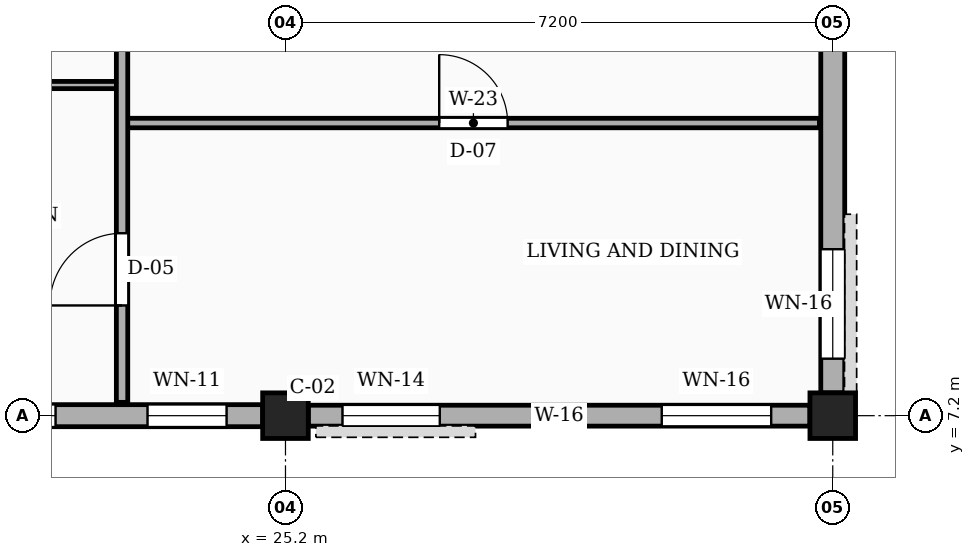
"""IFC4 building model, lengths in metres.
Left out: names, types, materials, properties, quantities, classifications, styles, units other than length and angle.
Written with IfcOpenShell. Run it as: python <this file> out.ifc"""

import sys

from ifc_helpers import new_model, si_unit, direction, frame, frame_2d, origin, origin_2d, place, context, subcontext, project, spatial, rectangle, extrude, element, fill, save


model = new_model("IFC4")
c1 = context("Model", 3, precision=1e-05, world=origin(), true_north=direction((0.0, 1.0)))
c2 = subcontext(c1, "Body", "Model", "MODEL_VIEW")
j1 = project(units=[si_unit("LENGTHUNIT", "METRE"), si_unit("PLANEANGLEUNIT", "RADIAN")], contexts=[c1])
p1 = place(None, origin())
s1 = spatial("IfcSite", under=j1, at=p1, CompositionType="ELEMENT")
p2 = place(p1, origin())
s2 = spatial("IfcBuilding", under=s1, at=p2, CompositionType="ELEMENT")
p3 = place(p2, frame((0.0, 0.0, 4.5)))
s3 = spatial("IfcBuildingStorey", under=s2, at=p3, CompositionType="ELEMENT", Elevation=4.5)
for number, where, z_axis, x_axis in (
    (1, (25.2, 7.2, 0.0), (0.0, 0.0, 1.0), (1.0, 0.0, 0.0)),
    (2, (32.4, 7.2, 0.0), (0.0, 0.0, 1.0), (1.0, 0.0, 0.0)),
):
    element("IfcColumn", number, at=place(p3, frame(where, z_axis=z_axis, x_axis=x_axis)), inside=s3, PredefinedType="COLUMN", context=c2, shape_type="SweptSolid", body=[
        extrude(rectangle(XDim=0.6, YDim=0.6, at=origin_2d()), origin(), (0.0, 0.0, 1.0), 3.15),
    ])
p4 = place(p3, frame((18.3, 7.2, 0.0), z_axis=(0.0, 0.0, 1.0), x_axis=(1.0, 0.0, 0.0)))
e3 = element("IfcWall", 3, at=p4, inside=s3, PredefinedType="SOLIDWALL", context=c2, shape_type="SweptSolid", body=[
    extrude(rectangle(XDim=6.6, YDim=0.29, at=frame_2d((3.3, 0.0))), origin(), (0.0, 0.0, 1.0), 2.44),
])
p5 = place(p4, frame((0.45, 0.0, 0.78)))
e4 = element("IfcOpeningElement", 4, at=p5, cuts=e3, PredefinedType="OPENING", context=c2, shape_type="SweptSolid", body=[
    extrude(rectangle(XDim=1.04, YDim=1.26, at=frame_2d((0.52, 0.63))), frame((0.0, 0.155, 0.0), z_axis=(0.0, -1.0, 0.0), x_axis=(1.0, 0.0, 0.0)), (0.0, 0.0, 1.0), 0.31),
])
p6 = place(p4, frame((2.675, 0.0, 0.78)))
e5 = element("IfcOpeningElement", 5, at=p6, cuts=e3, PredefinedType="OPENING", context=c2, shape_type="SweptSolid", body=[
    extrude(rectangle(XDim=1.2, YDim=1.26, at=frame_2d((0.6, 0.63))), frame((0.0, 0.155, 0.0), z_axis=(0.0, -1.0, 0.0), x_axis=(1.0, 0.0, 0.0)), (0.0, 0.0, 1.0), 0.31),
])
p7 = place(p4, frame((5.085, 0.0, 0.78)))
e6 = element("IfcOpeningElement", 6, at=p7, cuts=e3, PredefinedType="OPENING", context=c2, shape_type="SweptSolid", body=[
    extrude(rectangle(XDim=1.04, YDim=1.26, at=frame_2d((0.52, 0.63))), frame((0.0, 0.155, 0.0), z_axis=(0.0, -1.0, 0.0), x_axis=(1.0, 0.0, 0.0)), (0.0, 0.0, 1.0), 0.31),
])
p8 = place(p3, frame((25.5, 7.2, 0.0), z_axis=(0.0, 0.0, 1.0), x_axis=(1.0, 0.0, 0.0)))
e7 = element("IfcWall", 7, at=p8, inside=s3, PredefinedType="SOLIDWALL", context=c2, shape_type="SweptSolid", body=[
    extrude(rectangle(XDim=6.6, YDim=0.275, at=frame_2d((3.3, 0.0))), origin(), (0.0, 0.0, 1.0), 2.44),
])
p9 = place(p8, frame((0.45, 0.0, 0.78)))
e8 = element("IfcOpeningElement", 8, at=p9, cuts=e7, PredefinedType="OPENING", context=c2, shape_type="SweptSolid", body=[
    extrude(rectangle(XDim=1.28, YDim=1.26, at=frame_2d((0.64, 0.63))), frame((0.0, 0.147, 0.0), z_axis=(0.0, -1.0, 0.0), x_axis=(1.0, 0.0, 0.0)), (0.0, 0.0, 1.0), 0.295),
])
p10 = place(p8, frame((4.65, 0.0, 0.78)))
e9 = element("IfcOpeningElement", 9, at=p10, cuts=e7, PredefinedType="OPENING", context=c2, shape_type="SweptSolid", body=[
    extrude(rectangle(XDim=1.44, YDim=1.26, at=frame_2d((0.72, 0.63))), frame((0.0, 0.147, 0.0), z_axis=(0.0, -1.0, 0.0), x_axis=(1.0, 0.0, 0.0)), (0.0, 0.0, 1.0), 0.295),
])
p11 = place(p3, frame((32.4, 7.5, 0.0), z_axis=(0.0, 0.0, 1.0), x_axis=(0.0, 1.0, 0.0)))
e10 = element("IfcWall", 10, at=p11, inside=s3, PredefinedType="SOLIDWALL", context=c2, shape_type="SweptSolid", body=[
    extrude(rectangle(XDim=6.6, YDim=0.315, at=frame_2d((3.3, 0.0))), origin(), (0.0, 0.0, 1.0), 2.44),
])
p12 = place(p11, frame((0.45, 0.0, 0.78)))
e11 = element("IfcOpeningElement", 11, at=p12, cuts=e10, PredefinedType="OPENING", context=c2, shape_type="SweptSolid", body=[
    extrude(rectangle(XDim=1.44, YDim=1.26, at=frame_2d((0.72, 0.63))), frame((0.0, 0.167, 0.0), z_axis=(0.0, -1.0, 0.0), x_axis=(1.0, 0.0, 0.0)), (0.0, 0.0, 1.0), 0.335),
])
p13 = place(p11, frame((4.65, 0.0, 0.78)))
e12 = element("IfcOpeningElement", 12, at=p13, cuts=e10, PredefinedType="OPENING", context=c2, shape_type="SweptSolid", body=[
    extrude(rectangle(XDim=0.98, YDim=1.36, at=frame_2d((0.49, 0.68))), frame((0.0, 0.167, 0.0), z_axis=(0.0, -1.0, 0.0), x_axis=(1.0, 0.0, 0.0)), (0.0, 0.0, 1.0), 0.335),
])
p14 = place(p3, frame((23.12, 11.05, 0.0), z_axis=(0.0, 0.0, 1.0), x_axis=(1.0, 0.0, 0.0)))
e13 = element("IfcWall", 13, at=p14, inside=s3, PredefinedType="PARTITIONING", context=c2, shape_type="SweptSolid", body=[
    extrude(rectangle(XDim=9.105, YDim=0.125, at=frame_2d((4.552, 0.0))), origin(), (0.0, 0.0, 1.0), 2.305),
])
p15 = place(p14, frame((4.103, 0.0, 0.0)))
e14 = element("IfcOpeningElement", 14, at=p15, cuts=e13, PredefinedType="OPENING", context=c2, shape_type="SweptSolid", body=[
    extrude(rectangle(XDim=0.9, YDim=2.1, at=frame_2d((0.45, 1.05))), frame((0.0, 0.073, 0.0), z_axis=(0.0, -1.0, 0.0), x_axis=(1.0, 0.0, 0.0)), (0.0, 0.0, 1.0), 0.145),
])
p16 = place(p3, frame((20.19, 11.55, 0.0), z_axis=(0.0, 0.0, 1.0), x_axis=(1.0, 0.0, 0.0)))
e15 = element("IfcWall", 15, at=p16, inside=s3, PredefinedType="PARTITIONING", context=c2, shape_type="SweptSolid", body=[
    extrude(rectangle(XDim=2.79, YDim=0.095, at=frame_2d((1.395, 0.0))), origin(), (0.0, 0.0, 1.0), 2.305),
])
p17 = place(p16, frame((0.945, 0.0, 0.0)))
e16 = element("IfcOpeningElement", 16, at=p17, cuts=e15, PredefinedType="OPENING", context=c2, shape_type="SweptSolid", body=[
    extrude(rectangle(XDim=0.9, YDim=2.05, at=frame_2d((0.45, 1.025))), frame((0.0, 0.058, 0.0), z_axis=(0.0, -1.0, 0.0), x_axis=(1.0, 0.0, 0.0)), (0.0, 0.0, 1.0), 0.115),
])
p18 = place(p3, frame((23.05, 7.375, 0.0), z_axis=(0.0, 0.0, 1.0), x_axis=(0.0, 1.0, 0.0)))
e17 = element("IfcWall", 17, at=p18, inside=s3, PredefinedType="PARTITIONING", context=c2, shape_type="SweptSolid", body=[
    extrude(rectangle(XDim=6.885, YDim=0.15, at=frame_2d((3.442, 0.0))), origin(), (0.0, 0.0, 1.0), 2.305),
])
p19 = place(p18, frame((1.275, 0.0, 0.0)))
e18 = element("IfcOpeningElement", 18, at=p19, cuts=e17, PredefinedType="OPENING", context=c2, shape_type="SweptSolid", body=[
    extrude(rectangle(XDim=0.95, YDim=2.1, at=frame_2d((0.475, 1.05))), frame((0.0, 0.085, 0.0), z_axis=(0.0, -1.0, 0.0), x_axis=(1.0, 0.0, 0.0)), (0.0, 0.0, 1.0), 0.17),
])
p20 = place(p6, origin())
e19 = element("IfcWindow", 19, at=p20, inside=s3, PartitioningType="SINGLE_PANEL", PredefinedType="WINDOW", context=c2, shape_type="SweptSolid", body=[
    extrude(rectangle(XDim=1.2, YDim=1.26, at=frame_2d((0.6, 0.63))), frame((0.0, 0.03, 0.0), z_axis=(0.0, -1.0, 0.0), x_axis=(1.0, 0.0, 0.0)), (0.0, 0.0, 1.0), 0.06),
])
fill(e5, e19)
p21 = place(p7, origin())
e20 = element("IfcWindow", 20, at=p21, inside=s3, PartitioningType="SINGLE_PANEL", PredefinedType="WINDOW", context=c2, shape_type="SweptSolid", body=[
    extrude(rectangle(XDim=1.04, YDim=1.26, at=frame_2d((0.52, 0.63))), frame((0.0, 0.03, 0.0), z_axis=(0.0, -1.0, 0.0), x_axis=(1.0, 0.0, 0.0)), (0.0, 0.0, 1.0), 0.06),
])
fill(e6, e20)
p22 = place(p9, origin())
e21 = element("IfcWindow", 21, at=p22, inside=s3, PartitioningType="SINGLE_PANEL", PredefinedType="WINDOW", context=c2, shape_type="SweptSolid", body=[
    extrude(rectangle(XDim=1.28, YDim=1.26, at=frame_2d((0.64, 0.63))), frame((0.0, 0.03, 0.0), z_axis=(0.0, -1.0, 0.0), x_axis=(1.0, 0.0, 0.0)), (0.0, 0.0, 1.0), 0.06),
])
fill(e8, e21)
p23 = place(p10, origin())
e22 = element("IfcWindow", 22, at=p23, inside=s3, PartitioningType="SINGLE_PANEL", PredefinedType="WINDOW", context=c2, shape_type="SweptSolid", body=[
    extrude(rectangle(XDim=1.44, YDim=1.26, at=frame_2d((0.72, 0.63))), frame((0.0, 0.03, 0.0), z_axis=(0.0, -1.0, 0.0), x_axis=(1.0, 0.0, 0.0)), (0.0, 0.0, 1.0), 0.06),
])
fill(e9, e22)
p24 = place(p12, origin())
e23 = element("IfcWindow", 23, at=p24, inside=s3, PartitioningType="SINGLE_PANEL", PredefinedType="WINDOW", context=c2, shape_type="SweptSolid", body=[
    extrude(rectangle(XDim=1.44, YDim=1.26, at=frame_2d((0.72, 0.63))), frame((0.0, 0.03, 0.0), z_axis=(0.0, -1.0, 0.0), x_axis=(1.0, 0.0, 0.0)), (0.0, 0.0, 1.0), 0.06),
])
fill(e11, e23)
p25 = place(p15, origin())
e24 = element("IfcDoor", 24, at=p25, inside=s3, OperationType="SINGLE_SWING_LEFT", PredefinedType="DOOR", context=c2, shape_type="SweptSolid", body=[
    extrude(rectangle(XDim=0.9, YDim=2.1, at=frame_2d((0.45, 1.05))), frame((0.0, 0.025, 0.0), z_axis=(0.0, -1.0, 0.0), x_axis=(1.0, 0.0, 0.0)), (0.0, 0.0, 1.0), 0.05),
])
fill(e14, e24)
p26 = place(p19, origin())
e25 = element("IfcDoor", 25, at=p26, inside=s3, OperationType="SINGLE_SWING_LEFT", PredefinedType="DOOR", context=c2, shape_type="SweptSolid", body=[
    extrude(rectangle(XDim=0.95, YDim=2.1, at=frame_2d((0.475, 1.05))), frame((0.0, 0.025, 0.0), z_axis=(0.0, -1.0, 0.0), x_axis=(1.0, 0.0, 0.0)), (0.0, 0.0, 1.0), 0.05),
])
fill(e18, e25)
save(model, sys.argv[1])
